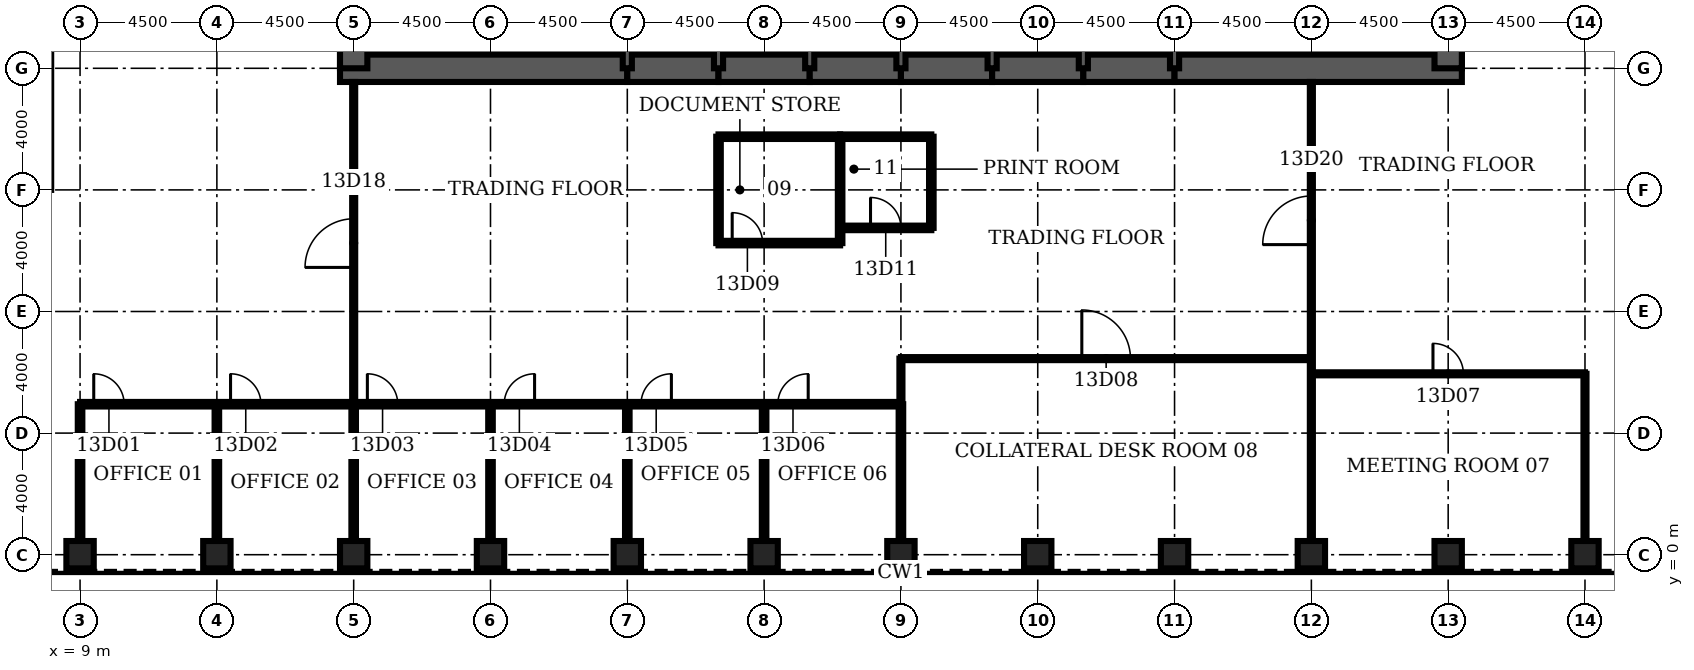
"""IFC4 building model, lengths in metres.
Left out: names, types, materials, properties, quantities, classifications, styles, units other than length and angle.
Written with IfcOpenShell. Run it as: python <this file> out.ifc"""

import sys

from ifc_helpers import new_model, si_unit, direction, frame, frame_2d, origin, origin_2d, place, context, subcontext, project, spatial, rectangle, hollow_rectangle, extrude, element, fill, save


model = new_model("IFC4")
c1 = context("Model", 3, precision=1e-05, world=origin(), true_north=direction((0.0, 1.0)))
c2 = subcontext(c1, "Body", "Model", "MODEL_VIEW")
j1 = project(units=[si_unit("LENGTHUNIT", "METRE"), si_unit("PLANEANGLEUNIT", "RADIAN")], contexts=[c1])
p1 = place(None, origin())
s1 = spatial("IfcSite", under=j1, at=p1, CompositionType="ELEMENT")
p2 = place(p1, origin())
s2 = spatial("IfcBuilding", under=s1, at=p2, CompositionType="ELEMENT")
p3 = place(p2, frame((0.0, 0.0, 63.5)))
s3 = spatial("IfcBuildingStorey", under=s2, at=p3, CompositionType="ELEMENT", Elevation=63.5)
for number, where, z_axis, x_axis in (
    (1, (9.0, 0.0, 0.0), (0.0, 0.0, 1.0), (0.0, 1.0, 0.0)),
    (2, (13.5, 0.0, 0.0), (0.0, 0.0, 1.0), (0.0, 1.0, 0.0)),
    (3, (18.0, 0.0, 0.0), (0.0, 0.0, 1.0), (0.0, 1.0, 0.0)),
    (4, (22.5, 0.0, 0.0), (0.0, 0.0, 1.0), (0.0, 1.0, 0.0)),
    (5, (27.0, 0.0, 0.0), (0.0, 0.0, 1.0), (0.0, 1.0, 0.0)),
    (6, (31.5, 0.0, 0.0), (0.0, 0.0, 1.0), (0.0, 1.0, 0.0)),
    (7, (36.0, 0.0, 0.0), (0.0, 0.0, 1.0), (0.0, 1.0, 0.0)),
    (8, (40.5, 0.0, 0.0), (0.0, 0.0, 1.0), (0.0, 1.0, 0.0)),
    (9, (45.0, 0.0, 0.0), (0.0, 0.0, 1.0), (0.0, 1.0, 0.0)),
    (10, (49.5, 0.0, 0.0), (0.0, 0.0, 1.0), (0.0, 1.0, 0.0)),
    (11, (54.0, 0.0, 0.0), (0.0, 0.0, 1.0), (0.0, 1.0, 0.0)),
    (12, (58.5, 0.0, 0.0), (0.0, 0.0, 1.0), (0.0, 1.0, 0.0)),
):
    element("IfcColumn", number, at=place(p3, frame(where, z_axis=z_axis, x_axis=x_axis)), inside=s3, PredefinedType="COLUMN", context=c2, shape_type="SweptSolid", body=[
        extrude(hollow_rectangle(XDim=0.9, YDim=0.9, WallThickness=0.12, at=origin_2d()), origin(), (0.0, 0.0, 1.0), 4.5),
    ])
p4 = place(p3, frame((17.55, 16.0, 0.0), z_axis=(0.0, 0.0, 1.0), x_axis=(1.0, 0.0, 0.0)))
e13 = element("IfcWall", 13, at=p4, inside=s3, PredefinedType="SHEAR", context=c2, shape_type="SweptSolid", body=[
    extrude(rectangle(XDim=9.45, YDim=0.9, at=frame_2d((4.725, 0.0))), origin(), (0.0, 0.0, 1.0), 4.5),
])
for number, where, z_axis, x_axis in (
    (14, (27.0, 16.0, 0.0), (0.0, 0.0, 1.0), (1.0, 0.0, 0.0)),
    (15, (30.0, 16.0, 0.0), (0.0, 0.0, 1.0), (1.0, 0.0, 0.0)),
    (16, (33.0, 16.0, 0.0), (0.0, 0.0, 1.0), (1.0, 0.0, 0.0)),
    (17, (36.0, 16.0, 0.0), (0.0, 0.0, 1.0), (1.0, 0.0, 0.0)),
    (18, (39.0, 16.0, 0.0), (0.0, 0.0, 1.0), (1.0, 0.0, 0.0)),
    (19, (42.0, 16.0, 0.0), (0.0, 0.0, 1.0), (1.0, 0.0, 0.0)),
):
    element("IfcWall", number, at=place(p3, frame(where, z_axis=z_axis, x_axis=x_axis)), inside=s3, PredefinedType="SHEAR", context=c2, shape_type="SweptSolid", body=[
        extrude(rectangle(XDim=3.0, YDim=0.9, at=frame_2d((1.5, 0.0))), origin(), (0.0, 0.0, 1.0), 4.5),
    ])
p5 = place(p3, frame((45.0, 16.0, 0.0), z_axis=(0.0, 0.0, 1.0), x_axis=(1.0, 0.0, 0.0)))
e20 = element("IfcWall", 20, at=p5, inside=s3, PredefinedType="SHEAR", context=c2, shape_type="SweptSolid", body=[
    extrude(rectangle(XDim=9.45, YDim=0.9, at=frame_2d((4.725, 0.0))), origin(), (0.0, 0.0, 1.0), 4.5),
])
for number, where, z_axis, x_axis in (
    (21, (18.0, 19.2, 0.0), (0.0, 0.0, 1.0), (0.0, -1.0, 0.0)),
    (22, (54.0, 16.0, 0.0), (0.0, 0.0, 1.0), (0.0, 1.0, 0.0)),
):
    element("IfcWall", number, at=place(p3, frame(where, z_axis=z_axis, x_axis=x_axis)), inside=s3, PredefinedType="SHEAR", context=c2, shape_type="SweptSolid", body=[
        extrude(rectangle(XDim=3.2, YDim=0.9, at=frame_2d((1.6, 0.0))), origin(), (0.0, 0.0, 1.0), 4.5),
    ])
for number, where, z_axis, x_axis in (
    (23, (27.0, 16.0, 0.0), (0.0, 0.0, 1.0), (0.0, 1.0, 0.0)),
    (24, (30.0, 16.0, 0.0), (0.0, 0.0, 1.0), (0.0, 1.0, 0.0)),
    (25, (33.0, 16.0, 0.0), (0.0, 0.0, 1.0), (0.0, 1.0, 0.0)),
    (26, (36.0, 16.0, 0.0), (0.0, 0.0, 1.0), (0.0, 1.0, 0.0)),
    (27, (39.0, 16.0, 0.0), (0.0, 0.0, 1.0), (0.0, 1.0, 0.0)),
    (28, (42.0, 16.0, 0.0), (0.0, 0.0, 1.0), (0.0, 1.0, 0.0)),
    (29, (45.0, 16.0, 0.0), (0.0, 0.0, 1.0), (0.0, 1.0, 0.0)),
):
    element("IfcWall", number, at=place(p3, frame(where, z_axis=z_axis, x_axis=x_axis)), inside=s3, PredefinedType="SOLIDWALL", context=c2, shape_type="SweptSolid", body=[
        extrude(rectangle(XDim=3.2, YDim=0.3, at=frame_2d((1.6, 0.0))), origin(), (0.0, 0.0, 1.0), 4.5),
    ])
p6 = place(p3, frame((9.0, 4.95, 0.0), z_axis=(0.0, 0.0, 1.0), x_axis=(1.0, 0.0, 0.0)))
e30 = element("IfcWall", 30, at=p6, inside=s3, PredefinedType="PARTITIONING", context=c2, shape_type="SweptSolid", body=[
    extrude(rectangle(XDim=27.0, YDim=0.15, at=frame_2d((13.5, 0.0))), origin(), (0.0, 0.0, 1.0), 3.0),
])
p7 = place(p6, frame((0.45, 0.0, 0.0)))
e31 = element("IfcOpeningElement", 31, at=p7, cuts=e30, PredefinedType="OPENING", context=c2, shape_type="SweptSolid", body=[
    extrude(rectangle(XDim=1.0, YDim=2.1, at=frame_2d((0.5, 1.05))), frame((0.0, 0.085, 0.0), z_axis=(0.0, -1.0, 0.0), x_axis=(1.0, 0.0, 0.0)), (0.0, 0.0, 1.0), 0.17),
])
p8 = place(p6, frame((4.95, 0.0, 0.0)))
e32 = element("IfcOpeningElement", 32, at=p8, cuts=e30, PredefinedType="OPENING", context=c2, shape_type="SweptSolid", body=[
    extrude(rectangle(XDim=1.0, YDim=2.1, at=frame_2d((0.5, 1.05))), frame((0.0, 0.085, 0.0), z_axis=(0.0, -1.0, 0.0), x_axis=(1.0, 0.0, 0.0)), (0.0, 0.0, 1.0), 0.17),
])
p9 = place(p6, frame((9.45, 0.0, 0.0)))
e33 = element("IfcOpeningElement", 33, at=p9, cuts=e30, PredefinedType="OPENING", context=c2, shape_type="SweptSolid", body=[
    extrude(rectangle(XDim=1.0, YDim=2.1, at=frame_2d((0.5, 1.05))), frame((0.0, 0.085, 0.0), z_axis=(0.0, -1.0, 0.0), x_axis=(1.0, 0.0, 0.0)), (0.0, 0.0, 1.0), 0.17),
])
p10 = place(p6, frame((13.95, 0.0, 0.0)))
e34 = element("IfcOpeningElement", 34, at=p10, cuts=e30, PredefinedType="OPENING", context=c2, shape_type="SweptSolid", body=[
    extrude(rectangle(XDim=1.0, YDim=2.1, at=frame_2d((0.5, 1.05))), frame((0.0, 0.085, 0.0), z_axis=(0.0, -1.0, 0.0), x_axis=(1.0, 0.0, 0.0)), (0.0, 0.0, 1.0), 0.17),
])
p11 = place(p6, frame((18.45, 0.0, 0.0)))
e35 = element("IfcOpeningElement", 35, at=p11, cuts=e30, PredefinedType="OPENING", context=c2, shape_type="SweptSolid", body=[
    extrude(rectangle(XDim=1.0, YDim=2.1, at=frame_2d((0.5, 1.05))), frame((0.0, 0.085, 0.0), z_axis=(0.0, -1.0, 0.0), x_axis=(1.0, 0.0, 0.0)), (0.0, 0.0, 1.0), 0.17),
])
p12 = place(p6, frame((22.95, 0.0, 0.0)))
e36 = element("IfcOpeningElement", 36, at=p12, cuts=e30, PredefinedType="OPENING", context=c2, shape_type="SweptSolid", body=[
    extrude(rectangle(XDim=1.0, YDim=2.1, at=frame_2d((0.5, 1.05))), frame((0.0, 0.085, 0.0), z_axis=(0.0, -1.0, 0.0), x_axis=(1.0, 0.0, 0.0)), (0.0, 0.0, 1.0), 0.17),
])
p13 = place(p3, frame((49.5, 5.95, 0.0), z_axis=(0.0, 0.0, 1.0), x_axis=(1.0, 0.0, 0.0)))
e37 = element("IfcWall", 37, at=p13, inside=s3, PredefinedType="PARTITIONING", context=c2, shape_type="SweptSolid", body=[
    extrude(rectangle(XDim=9.0, YDim=0.1, at=frame_2d((4.5, 0.0))), origin(), (0.0, 0.0, 1.0), 3.0),
])
p14 = place(p13, frame((4.0, 0.0, 0.0)))
e38 = element("IfcOpeningElement", 38, at=p14, cuts=e37, PredefinedType="OPENING", context=c2, shape_type="SweptSolid", body=[
    extrude(rectangle(XDim=1.0, YDim=2.1, at=frame_2d((0.5, 1.05))), frame((0.0, 0.06, 0.0), z_axis=(0.0, -1.0, 0.0), x_axis=(1.0, 0.0, 0.0)), (0.0, 0.0, 1.0), 0.12),
])
p15 = place(p3, frame((36.0, 6.45, 0.0), z_axis=(0.0, 0.0, 1.0), x_axis=(1.0, 0.0, 0.0)))
e39 = element("IfcWall", 39, at=p15, inside=s3, PredefinedType="PARTITIONING", context=c2, shape_type="SweptSolid", body=[
    extrude(rectangle(XDim=13.5, YDim=0.1, at=frame_2d((6.75, 0.0))), origin(), (0.0, 0.0, 1.0), 3.0),
])
p16 = place(p15, frame((5.95, 0.0, 0.0)))
e40 = element("IfcOpeningElement", 40, at=p16, cuts=e39, PredefinedType="OPENING", context=c2, shape_type="SweptSolid", body=[
    extrude(rectangle(XDim=1.6, YDim=2.1, at=frame_2d((0.8, 1.05))), frame((0.0, 0.06, 0.0), z_axis=(0.0, -1.0, 0.0), x_axis=(1.0, 0.0, 0.0)), (0.0, 0.0, 1.0), 0.12),
])
p17 = place(p3, frame((30.0, 10.25, 0.0), z_axis=(0.0, 0.0, 1.0), x_axis=(1.0, 0.0, 0.0)))
e41 = element("IfcWall", 41, at=p17, inside=s3, PredefinedType="PARTITIONING", context=c2, shape_type="SweptSolid", body=[
    extrude(rectangle(XDim=4.0, YDim=0.15, at=frame_2d((2.0, 0.0))), origin(), (0.0, 0.0, 1.0), 3.0),
])
p18 = place(p17, frame((0.45, 0.0, 0.0)))
e42 = element("IfcOpeningElement", 42, at=p18, cuts=e41, PredefinedType="OPENING", context=c2, shape_type="SweptSolid", body=[
    extrude(rectangle(XDim=1.0, YDim=2.1, at=frame_2d((0.5, 1.05))), frame((0.0, 0.085, 0.0), z_axis=(0.0, -1.0, 0.0), x_axis=(1.0, 0.0, 0.0)), (0.0, 0.0, 1.0), 0.17),
])
p19 = place(p3, frame((34.0, 10.75, 0.0), z_axis=(0.0, 0.0, 1.0), x_axis=(1.0, 0.0, 0.0)))
e43 = element("IfcWall", 43, at=p19, inside=s3, PredefinedType="PARTITIONING", context=c2, shape_type="SweptSolid", body=[
    extrude(rectangle(XDim=3.0, YDim=0.15, at=frame_2d((1.5, 0.0))), origin(), (0.0, 0.0, 1.0), 3.0),
])
p20 = place(p19, frame((1.0, 0.0, 0.0)))
e44 = element("IfcOpeningElement", 44, at=p20, cuts=e43, PredefinedType="OPENING", context=c2, shape_type="SweptSolid", body=[
    extrude(rectangle(XDim=1.0, YDim=2.1, at=frame_2d((0.5, 1.05))), frame((0.0, 0.085, 0.0), z_axis=(0.0, -1.0, 0.0), x_axis=(1.0, 0.0, 0.0)), (0.0, 0.0, 1.0), 0.17),
])
p21 = place(p3, frame((30.0, 13.75, 0.0), z_axis=(0.0, 0.0, 1.0), x_axis=(1.0, 0.0, 0.0)))
e45 = element("IfcWall", 45, at=p21, inside=s3, PredefinedType="PARTITIONING", context=c2, shape_type="SweptSolid", body=[
    extrude(rectangle(XDim=4.0, YDim=0.15, at=frame_2d((2.0, 0.0))), origin(), (0.0, 0.0, 1.0), 3.0),
])
p22 = place(p3, frame((34.0, 13.75, 0.0), z_axis=(0.0, 0.0, 1.0), x_axis=(1.0, 0.0, 0.0)))
e46 = element("IfcWall", 46, at=p22, inside=s3, PredefinedType="PARTITIONING", context=c2, shape_type="SweptSolid", body=[
    extrude(rectangle(XDim=3.0, YDim=0.15, at=frame_2d((1.5, 0.0))), origin(), (0.0, 0.0, 1.0), 3.0),
])
for number, where, z_axis, x_axis in (
    (47, (9.0, 0.45, 0.0), (0.0, 0.0, 1.0), (0.0, 1.0, 0.0)),
    (48, (13.5, 0.45, 0.0), (0.0, 0.0, 1.0), (0.0, 1.0, 0.0)),
    (49, (18.0, 0.45, 0.0), (0.0, 0.0, 1.0), (0.0, 1.0, 0.0)),
):
    element("IfcWall", number, at=place(p3, frame(where, z_axis=z_axis, x_axis=x_axis)), inside=s3, PredefinedType="PARTITIONING", context=c2, shape_type="SweptSolid", body=[
        extrude(rectangle(XDim=4.5, YDim=0.15, at=frame_2d((2.25, 0.0))), origin(), (0.0, 0.0, 1.0), 3.0),
    ])
p23 = place(p3, frame((18.0, 4.95, 0.0), z_axis=(0.0, 0.0, 1.0), x_axis=(0.0, 1.0, 0.0)))
e50 = element("IfcWall", 50, at=p23, inside=s3, PredefinedType="PARTITIONING", context=c2, shape_type="SweptSolid", body=[
    extrude(rectangle(XDim=10.6, YDim=0.1, at=frame_2d((5.3, 0.0))), origin(), (0.0, 0.0, 1.0), 3.0),
])
p24 = place(p23, frame((4.5, 0.0, 0.0)))
e51 = element("IfcOpeningElement", 51, at=p24, cuts=e50, PredefinedType="OPENING", context=c2, shape_type="SweptSolid", body=[
    extrude(rectangle(XDim=1.6, YDim=2.1, at=frame_2d((0.8, 1.05))), frame((0.0, 0.06, 0.0), z_axis=(0.0, -1.0, 0.0), x_axis=(1.0, 0.0, 0.0)), (0.0, 0.0, 1.0), 0.12),
])
for number, where, z_axis, x_axis in (
    (52, (22.5, 0.45, 0.0), (0.0, 0.0, 1.0), (0.0, 1.0, 0.0)),
    (53, (27.0, 0.45, 0.0), (0.0, 0.0, 1.0), (0.0, 1.0, 0.0)),
):
    element("IfcWall", number, at=place(p3, frame(where, z_axis=z_axis, x_axis=x_axis)), inside=s3, PredefinedType="PARTITIONING", context=c2, shape_type="SweptSolid", body=[
        extrude(rectangle(XDim=4.5, YDim=0.15, at=frame_2d((2.25, 0.0))), origin(), (0.0, 0.0, 1.0), 3.0),
    ])
p25 = place(p3, frame((30.0, 10.25, 0.0), z_axis=(0.0, 0.0, 1.0), x_axis=(0.0, 1.0, 0.0)))
e54 = element("IfcWall", 54, at=p25, inside=s3, PredefinedType="PARTITIONING", context=c2, shape_type="SweptSolid", body=[
    extrude(rectangle(XDim=3.5, YDim=0.15, at=frame_2d((1.75, 0.0))), origin(), (0.0, 0.0, 1.0), 3.0),
])
p26 = place(p3, frame((31.5, 0.45, 0.0), z_axis=(0.0, 0.0, 1.0), x_axis=(0.0, 1.0, 0.0)))
e55 = element("IfcWall", 55, at=p26, inside=s3, PredefinedType="PARTITIONING", context=c2, shape_type="SweptSolid", body=[
    extrude(rectangle(XDim=4.5, YDim=0.15, at=frame_2d((2.25, 0.0))), origin(), (0.0, 0.0, 1.0), 3.0),
])
p27 = place(p3, frame((34.0, 10.25, 0.0), z_axis=(0.0, 0.0, 1.0), x_axis=(0.0, 1.0, 0.0)))
e56 = element("IfcWall", 56, at=p27, inside=s3, PredefinedType="PARTITIONING", context=c2, shape_type="SweptSolid", body=[
    extrude(rectangle(XDim=3.5, YDim=0.15, at=frame_2d((1.75, 0.0))), origin(), (0.0, 0.0, 1.0), 3.0),
])
p28 = place(p3, frame((36.0, 0.45, 0.0), z_axis=(0.0, 0.0, 1.0), x_axis=(0.0, 1.0, 0.0)))
e57 = element("IfcWall", 57, at=p28, inside=s3, PredefinedType="PARTITIONING", context=c2, shape_type="SweptSolid", body=[
    extrude(rectangle(XDim=4.5, YDim=0.15, at=frame_2d((2.25, 0.0))), origin(), (0.0, 0.0, 1.0), 3.0),
])
p29 = place(p3, frame((36.0, 4.95, 0.0), z_axis=(0.0, 0.0, 1.0), x_axis=(0.0, 1.0, 0.0)))
e58 = element("IfcWall", 58, at=p29, inside=s3, PredefinedType="PARTITIONING", context=c2, shape_type="SweptSolid", body=[
    extrude(rectangle(XDim=1.5, YDim=0.1, at=frame_2d((0.75, 0.0))), origin(), (0.0, 0.0, 1.0), 3.0),
])
p30 = place(p3, frame((37.0, 10.75, 0.0), z_axis=(0.0, 0.0, 1.0), x_axis=(0.0, 1.0, 0.0)))
e59 = element("IfcWall", 59, at=p30, inside=s3, PredefinedType="PARTITIONING", context=c2, shape_type="SweptSolid", body=[
    extrude(rectangle(XDim=3.0, YDim=0.15, at=frame_2d((1.5, 0.0))), origin(), (0.0, 0.0, 1.0), 3.0),
])
p31 = place(p3, frame((49.5, 0.45, 0.0), z_axis=(0.0, 0.0, 1.0), x_axis=(0.0, 1.0, 0.0)))
e60 = element("IfcWall", 60, at=p31, inside=s3, PredefinedType="PARTITIONING", context=c2, shape_type="SweptSolid", body=[
    extrude(rectangle(XDim=15.1, YDim=0.1, at=frame_2d((7.55, 0.0))), origin(), (0.0, 0.0, 1.0), 3.0),
])
p32 = place(p31, frame((9.75, 0.0, 0.0)))
e61 = element("IfcOpeningElement", 61, at=p32, cuts=e60, PredefinedType="OPENING", context=c2, shape_type="SweptSolid", body=[
    extrude(rectangle(XDim=1.6, YDim=2.1, at=frame_2d((0.8, 1.05))), frame((0.0, 0.06, 0.0), z_axis=(0.0, -1.0, 0.0), x_axis=(1.0, 0.0, 0.0)), (0.0, 0.0, 1.0), 0.12),
])
p33 = place(p3, frame((58.5, 0.45, 0.0), z_axis=(0.0, 0.0, 1.0), x_axis=(0.0, 1.0, 0.0)))
e62 = element("IfcWall", 62, at=p33, inside=s3, PredefinedType="PARTITIONING", context=c2, shape_type="SweptSolid", body=[
    extrude(rectangle(XDim=5.5, YDim=0.1, at=frame_2d((2.75, 0.0))), origin(), (0.0, 0.0, 1.0), 3.0),
])
p34 = place(p7, origin())
e63 = element("IfcDoor", 63, at=p34, inside=s3, OperationType="SINGLE_SWING_LEFT", PredefinedType="DOOR", context=c2, shape_type="SweptSolid", body=[
    extrude(rectangle(XDim=1.0, YDim=2.1, at=frame_2d((0.5, 1.05))), frame((0.0, 0.025, 0.0), z_axis=(0.0, -1.0, 0.0), x_axis=(1.0, 0.0, 0.0)), (0.0, 0.0, 1.0), 0.05),
])
fill(e31, e63)
p35 = place(p8, origin())
e64 = element("IfcDoor", 64, at=p35, inside=s3, OperationType="SINGLE_SWING_LEFT", PredefinedType="DOOR", context=c2, shape_type="SweptSolid", body=[
    extrude(rectangle(XDim=1.0, YDim=2.1, at=frame_2d((0.5, 1.05))), frame((0.0, 0.025, 0.0), z_axis=(0.0, -1.0, 0.0), x_axis=(1.0, 0.0, 0.0)), (0.0, 0.0, 1.0), 0.05),
])
fill(e32, e64)
p36 = place(p9, origin())
e65 = element("IfcDoor", 65, at=p36, inside=s3, OperationType="SINGLE_SWING_LEFT", PredefinedType="DOOR", context=c2, shape_type="SweptSolid", body=[
    extrude(rectangle(XDim=1.0, YDim=2.1, at=frame_2d((0.5, 1.05))), frame((0.0, 0.025, 0.0), z_axis=(0.0, -1.0, 0.0), x_axis=(1.0, 0.0, 0.0)), (0.0, 0.0, 1.0), 0.05),
])
fill(e33, e65)
p37 = place(p10, origin())
e66 = element("IfcDoor", 66, at=p37, inside=s3, OperationType="SINGLE_SWING_RIGHT", PredefinedType="DOOR", context=c2, shape_type="SweptSolid", body=[
    extrude(rectangle(XDim=1.0, YDim=2.1, at=frame_2d((0.5, 1.05))), frame((0.0, 0.025, 0.0), z_axis=(0.0, -1.0, 0.0), x_axis=(1.0, 0.0, 0.0)), (0.0, 0.0, 1.0), 0.05),
])
fill(e34, e66)
p38 = place(p11, origin())
e67 = element("IfcDoor", 67, at=p38, inside=s3, OperationType="SINGLE_SWING_RIGHT", PredefinedType="DOOR", context=c2, shape_type="SweptSolid", body=[
    extrude(rectangle(XDim=1.0, YDim=2.1, at=frame_2d((0.5, 1.05))), frame((0.0, 0.025, 0.0), z_axis=(0.0, -1.0, 0.0), x_axis=(1.0, 0.0, 0.0)), (0.0, 0.0, 1.0), 0.05),
])
fill(e35, e67)
p39 = place(p12, origin())
e68 = element("IfcDoor", 68, at=p39, inside=s3, OperationType="SINGLE_SWING_RIGHT", PredefinedType="DOOR", context=c2, shape_type="SweptSolid", body=[
    extrude(rectangle(XDim=1.0, YDim=2.1, at=frame_2d((0.5, 1.05))), frame((0.0, 0.025, 0.0), z_axis=(0.0, -1.0, 0.0), x_axis=(1.0, 0.0, 0.0)), (0.0, 0.0, 1.0), 0.05),
])
fill(e36, e68)
p40 = place(p14, origin())
e69 = element("IfcDoor", 69, at=p40, inside=s3, OperationType="SINGLE_SWING_LEFT", PredefinedType="DOOR", context=c2, shape_type="SweptSolid", body=[
    extrude(rectangle(XDim=1.0, YDim=2.1, at=frame_2d((0.5, 1.05))), frame((0.0, 0.025, 0.0), z_axis=(0.0, -1.0, 0.0), x_axis=(1.0, 0.0, 0.0)), (0.0, 0.0, 1.0), 0.05),
])
fill(e38, e69)
p41 = place(p16, origin())
e70 = element("IfcDoor", 70, at=p41, inside=s3, OperationType="SINGLE_SWING_LEFT", PredefinedType="DOOR", context=c2, shape_type="SweptSolid", body=[
    extrude(rectangle(XDim=1.6, YDim=2.1, at=frame_2d((0.8, 1.05))), frame((0.0, 0.025, 0.0), z_axis=(0.0, -1.0, 0.0), x_axis=(1.0, 0.0, 0.0)), (0.0, 0.0, 1.0), 0.05),
])
fill(e40, e70)
p42 = place(p18, origin())
e71 = element("IfcDoor", 71, at=p42, inside=s3, OperationType="SINGLE_SWING_LEFT", PredefinedType="DOOR", context=c2, shape_type="SweptSolid", body=[
    extrude(rectangle(XDim=1.0, YDim=2.1, at=frame_2d((0.5, 1.05))), frame((0.0, 0.025, 0.0), z_axis=(0.0, -1.0, 0.0), x_axis=(1.0, 0.0, 0.0)), (0.0, 0.0, 1.0), 0.05),
])
fill(e42, e71)
p43 = place(p20, origin())
e72 = element("IfcDoor", 72, at=p43, inside=s3, OperationType="SINGLE_SWING_LEFT", PredefinedType="DOOR", context=c2, shape_type="SweptSolid", body=[
    extrude(rectangle(XDim=1.0, YDim=2.1, at=frame_2d((0.5, 1.05))), frame((0.0, 0.025, 0.0), z_axis=(0.0, -1.0, 0.0), x_axis=(1.0, 0.0, 0.0)), (0.0, 0.0, 1.0), 0.05),
])
fill(e44, e72)
p44 = place(p24, origin())
e73 = element("IfcDoor", 73, at=p44, inside=s3, OperationType="SINGLE_SWING_LEFT", PredefinedType="DOOR", context=c2, shape_type="SweptSolid", body=[
    extrude(rectangle(XDim=1.6, YDim=2.1, at=frame_2d((0.8, 1.05))), frame((0.0, 0.025, 0.0), z_axis=(0.0, -1.0, 0.0), x_axis=(1.0, 0.0, 0.0)), (0.0, 0.0, 1.0), 0.05),
])
fill(e51, e73)
p45 = place(p32, origin())
e74 = element("IfcDoor", 74, at=p45, inside=s3, OperationType="SINGLE_SWING_LEFT", PredefinedType="DOOR", context=c2, shape_type="SweptSolid", body=[
    extrude(rectangle(XDim=1.6, YDim=2.1, at=frame_2d((0.8, 1.05))), frame((0.0, 0.025, 0.0), z_axis=(0.0, -1.0, 0.0), x_axis=(1.0, 0.0, 0.0)), (0.0, 0.0, 1.0), 0.05),
])
fill(e61, e74)
save(model, sys.argv[1])
